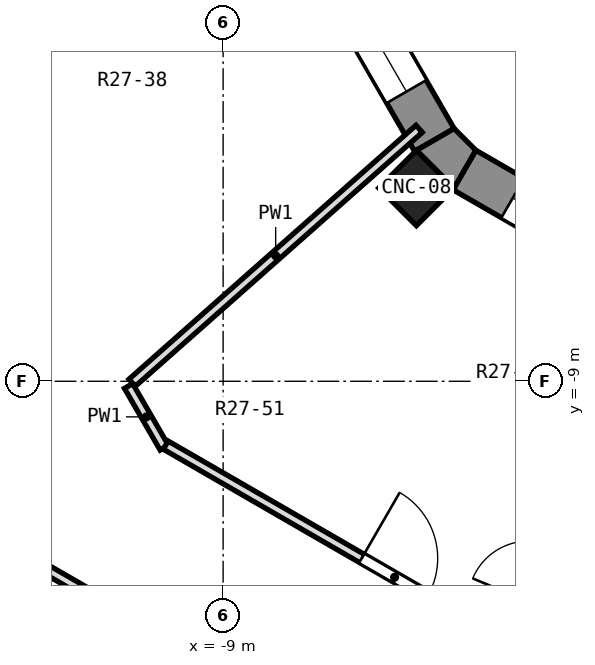
"""IFC4 building model, lengths in metres.
Left out: names, types, materials, properties, quantities, classifications, styles, units other than length and angle.
Written with IfcOpenShell. Run it as: python <this file> out.ifc"""

import sys

from ifc_helpers import new_model, si_unit, direction, frame, frame_2d, origin, origin_2d, place, context, subcontext, project, spatial, polyline, rectangle, outline, extrude, element, fill, save


model = new_model("IFC4")
c1 = context("Model", 3, precision=1e-05, world=origin(), true_north=direction((0.0, 1.0)))
c2 = subcontext(c1, "Body", "Model", "MODEL_VIEW")
j1 = project(units=[si_unit("LENGTHUNIT", "METRE"), si_unit("PLANEANGLEUNIT", "RADIAN")], contexts=[c1])
p1 = place(None, origin())
s1 = spatial("IfcSite", under=j1, at=p1, CompositionType="ELEMENT")
p2 = place(p1, origin())
s2 = spatial("IfcBuilding", under=s1, at=p2, CompositionType="ELEMENT")
p3 = place(p2, frame((0.0, 0.0, 180.6)))
s3 = spatial("IfcBuildingStorey", under=s2, at=p3, CompositionType="ELEMENT", Elevation=180.6)
p4 = place(p3, frame((-6.458, -6.458, 0.0), z_axis=(0.0, 0.0, 1.0), x_axis=(-0.707106781187, -0.707106781187, 0.0)))
e1 = element("IfcColumn", 1, at=p4, inside=s3, PredefinedType="COLUMN", context=c2, shape_type="SweptSolid", body=[
    extrude(rectangle(XDim=0.7, YDim=0.7, at=origin_2d()), origin(), (0.0, 0.0, 1.0), 3.3),
])
p5 = place(p3, frame((-8.156, -2.474, 0.0), z_axis=(0.0, 0.0, 1.0), x_axis=(0.500033728941, -0.866005929495, 0.0)))
e2 = element("IfcWall", 2, at=p5, inside=s3, PredefinedType="SOLIDWALL", context=c2, shape_type="SweptSolid", body=[
    extrude(rectangle(XDim=3.87, YDim=0.6, at=frame_2d((1.935, 0.0))), origin(), (0.0, 0.0, 1.0), 2.85),
])
p6 = place(p5, frame((0.735, 0.0, 0.9)))
e3 = element("IfcOpeningElement", 3, at=p6, cuts=e2, PredefinedType="OPENING", context=c2, shape_type="SweptSolid", body=[
    extrude(rectangle(XDim=2.4, YDim=1.8, at=frame_2d((1.2, 0.9))), frame((0.0, 0.312, 0.0), z_axis=(0.0, -1.0, 0.0), x_axis=(1.0, 0.0, 0.0)), (0.0, 0.0, 1.0), 0.624),
])
p7 = place(p3, frame((-5.826, -6.22, 0.0), z_axis=(0.0, 0.0, 1.0), x_axis=(0.866005929495, -0.500033728941, 0.0)))
e4 = element("IfcWall", 4, at=p7, inside=s3, PredefinedType="SOLIDWALL", context=c2, shape_type="SweptSolid", body=[
    extrude(rectangle(XDim=3.87, YDim=0.6, at=frame_2d((1.935, 0.0))), origin(), (0.0, 0.0, 1.0), 2.85),
])
p8 = place(p7, frame((0.735, 0.0, 0.9)))
e5 = element("IfcOpeningElement", 5, at=p8, cuts=e4, PredefinedType="OPENING", context=c2, shape_type="SweptSolid", body=[
    extrude(rectangle(XDim=2.4, YDim=1.8, at=frame_2d((1.2, 0.9))), frame((0.0, 0.312, 0.0), z_axis=(0.0, -1.0, 0.0), x_axis=(1.0, 0.0, 0.0)), (0.0, 0.0, 1.0), 0.624),
])
p9 = place(p3, origin())
e6 = element("IfcWall", 6, at=p9, inside=s3, PredefinedType="SOLIDWALL", context=c2, shape_type="SweptSolid", body=[
    extrude(outline(polyline([(-6.458, -5.962), (-5.962, -6.458), (-5.676, -5.961), (-5.961, -5.676), (-6.458, -5.962)])), origin(), (0.0, 0.0, 1.0), 2.85),
])
p10 = place(p3, frame((-10.244, -9.062, 0.0), z_axis=(0.0, 0.0, 1.0), x_axis=(0.501067067948, -0.865408454672, 0.0)))
e7 = element("IfcWall", 7, at=p10, inside=s3, PredefinedType="PARTITIONING", context=c2, shape_type="SweptSolid", body=[
    extrude(rectangle(XDim=0.938, YDim=0.125, at=frame_2d((0.469, 0.0))), origin(), (0.0, 0.0, 1.0), 2.85),
])
p11 = place(p3, frame((-11.366, -11.451, 0.0), z_axis=(0.0, 0.0, 1.0), x_axis=(0.866032091518, -0.499988416326, 0.0)))
e8 = element("IfcWall", 8, at=p11, inside=s3, PredefinedType="PARTITIONING", context=c2, shape_type="SweptSolid", body=[
    extrude(rectangle(XDim=8.37, YDim=0.125, at=frame_2d((4.185, 0.0))), origin(), (0.0, 0.0, 1.0), 2.85),
])
p12 = place(p11, frame((3.226, 0.0, 0.0)))
e9 = element("IfcOpeningElement", 9, at=p12, cuts=e8, PredefinedType="OPENING", context=c2, shape_type="SweptSolid", body=[
    extrude(rectangle(XDim=1.0, YDim=2.1, at=frame_2d((0.5, 1.05))), frame((0.0, 0.074, 0.0), z_axis=(0.0, -1.0, 0.0), x_axis=(1.0, 0.0, 0.0)), (0.0, 0.0, 1.0), 0.149),
])
p13 = place(p3, frame((-9.755, -9.84, 0.0), z_axis=(0.0, 0.0, 1.0), x_axis=(0.865968995572, -0.500097689165, 0.0)))
e10 = element("IfcWall", 10, at=p13, inside=s3, PredefinedType="PARTITIONING", context=c2, shape_type="SweptSolid", body=[
    extrude(rectangle(XDim=7.19, YDim=0.125, at=frame_2d((3.595, 0.0))), origin(), (0.0, 0.0, 1.0), 2.85),
])
p14 = place(p13, frame((2.977, 0.0, 0.0)))
e11 = element("IfcOpeningElement", 11, at=p14, cuts=e10, PredefinedType="OPENING", context=c2, shape_type="SweptSolid", body=[
    extrude(rectangle(XDim=1.0, YDim=2.1, at=frame_2d((0.5, 1.05))), frame((0.0, 0.074, 0.0), z_axis=(0.0, -1.0, 0.0), x_axis=(1.0, 0.0, 0.0)), (0.0, 0.0, 1.0), 0.149),
])
p15 = place(p3, frame((-10.196, -9.019, 0.0), z_axis=(0.0, 0.0, 1.0), x_axis=(0.74896790207, 0.662606279527, 0.0)))
e12 = element("IfcWall", 12, at=p15, inside=s3, PredefinedType="PARTITIONING", context=c2, shape_type="SweptSolid", body=[
    extrude(rectangle(XDim=5.041, YDim=0.125, at=frame_2d((2.52, 0.0))), origin(), (0.0, 0.0, 1.0), 2.85),
])
p16 = place(p3, frame((-5.189, -12.405, 0.0), z_axis=(0.0, 0.0, 1.0), x_axis=(0.385917276583, 0.922533389984, 0.0)))
e13 = element("IfcWall", 13, at=p16, inside=s3, PredefinedType="PARTITIONING", context=c2, shape_type="SweptSolid", body=[
    extrude(rectangle(XDim=1.904, YDim=0.1, at=frame_2d((0.952, 0.0))), origin(), (0.0, 0.0, 1.0), 2.85),
])
p17 = place(p16, frame((0.546, 0.0, 0.0)))
e14 = element("IfcOpeningElement", 14, at=p17, cuts=e13, PredefinedType="OPENING", context=c2, shape_type="SweptSolid", body=[
    extrude(rectangle(XDim=0.8, YDim=2.1, at=frame_2d((0.4, 1.05))), frame((0.0, 0.062, 0.0), z_axis=(0.0, -1.0, 0.0), x_axis=(1.0, 0.0, 0.0)), (0.0, 0.0, 1.0), 0.124),
])
p18 = place(p6, origin())
e15 = element("IfcWindow", 15, at=p18, inside=s3, PartitioningType="SINGLE_PANEL", PredefinedType="WINDOW", context=c2, shape_type="SweptSolid", body=[
    extrude(rectangle(XDim=2.4, YDim=1.8, at=frame_2d((1.2, 0.9))), frame((0.0, -0.12, 0.0), z_axis=(0.0, -1.0, 0.0), x_axis=(1.0, 0.0, 0.0)), (0.0, 0.0, 1.0), 0.06),
])
fill(e3, e15)
p19 = place(p8, origin())
e16 = element("IfcWindow", 16, at=p19, inside=s3, PartitioningType="SINGLE_PANEL", PredefinedType="WINDOW", context=c2, shape_type="SweptSolid", body=[
    extrude(rectangle(XDim=2.4, YDim=1.8, at=frame_2d((1.2, 0.9))), frame((0.0, -0.12, 0.0), z_axis=(0.0, -1.0, 0.0), x_axis=(1.0, 0.0, 0.0)), (0.0, 0.0, 1.0), 0.06),
])
fill(e5, e16)
p20 = place(p14, origin())
e17 = element("IfcDoor", 17, at=p20, inside=s3, OperationType="SINGLE_SWING_LEFT", PredefinedType="DOOR", context=c2, shape_type="SweptSolid", body=[
    extrude(rectangle(XDim=1.0, YDim=2.1, at=frame_2d((0.5, 1.05))), frame((0.0, 0.025, 0.0), z_axis=(0.0, -1.0, 0.0), x_axis=(1.0, 0.0, 0.0)), (0.0, 0.0, 1.0), 0.05),
])
fill(e11, e17)
save(model, sys.argv[1])
